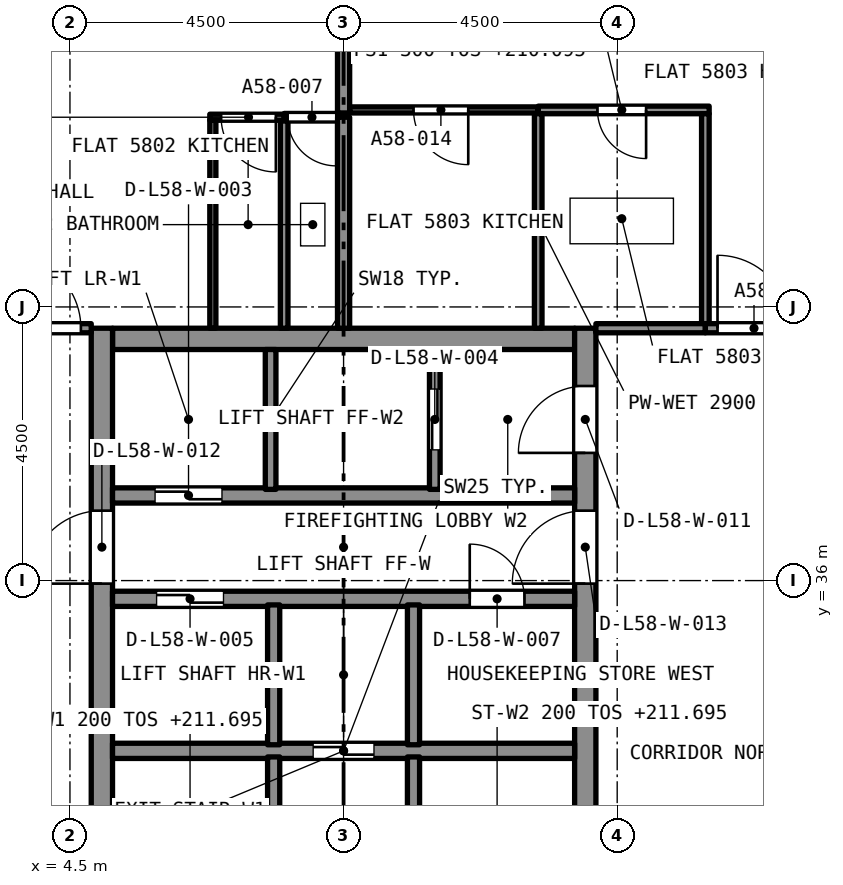
"""IFC4 building model, lengths in metres.
Left out: names, types, materials, properties, quantities, classifications, styles, units other than length and angle.
Written with IfcOpenShell. Run it as: python <this file> out.ifc"""

import sys

from ifc_helpers import new_model, si_unit, direction, frame, frame_2d, origin, place, context, subcontext, project, spatial, rectangle, extrude, element, fill, save


model = new_model("IFC4")
c1 = context("Model", 3, precision=1e-05, world=origin(), true_north=direction((0.0, 1.0)))
c2 = subcontext(c1, "Body", "Model", "MODEL_VIEW")
j1 = project(units=[si_unit("LENGTHUNIT", "METRE"), si_unit("PLANEANGLEUNIT", "RADIAN")], contexts=[c1])
p1 = place(None, origin())
s1 = spatial("IfcSite", under=j1, at=p1, CompositionType="ELEMENT")
p2 = place(p1, origin())
s2 = spatial("IfcBuilding", under=s1, at=p2, CompositionType="ELEMENT")
p3 = place(p2, frame((0.0, 0.0, 210.095)))
s3 = spatial("IfcBuildingStorey", under=s2, at=p3, CompositionType="ELEMENT", Elevation=210.095)
p4 = place(p3, frame((5.2, 39.975, 0.0), z_axis=(0.0, 0.0, 1.0), x_axis=(1.0, 0.0, 0.0)))
e1 = element("IfcWall", 1, at=p4, inside=s3, PredefinedType="SOLIDWALL", context=c2, shape_type="SweptSolid", body=[
    extrude(rectangle(XDim=7.6, YDim=0.35, at=frame_2d((3.8, 0.0))), origin(), (0.0, 0.0, 1.0), 3.2),
])
p5 = place(p3, frame((5.025, 27.35, 0.0), z_axis=(0.0, 0.0, 1.0), x_axis=(0.0, 1.0, 0.0)))
e2 = element("IfcWall", 2, at=p5, inside=s3, PredefinedType="SOLIDWALL", context=c2, shape_type="SweptSolid", body=[
    extrude(rectangle(XDim=12.8, YDim=0.35, at=frame_2d((6.4, 0.0))), origin(), (0.0, 0.0, 1.0), 3.2),
])
p6 = place(p5, frame((8.6, 0.0, 0.0)))
e3 = element("IfcOpeningElement", 3, at=p6, cuts=e2, PredefinedType="OPENING", context=c2, shape_type="SweptSolid", body=[
    extrude(rectangle(XDim=1.2, YDim=2.1, at=frame_2d((0.6, 1.05))), frame((0.0, 0.185, 0.0), z_axis=(0.0, -1.0, 0.0), x_axis=(1.0, 0.0, 0.0)), (0.0, 0.0, 1.0), 0.37),
])
p7 = place(p3, frame((12.975, 27.35, 0.0), z_axis=(0.0, 0.0, 1.0), x_axis=(0.0, 1.0, 0.0)))
e4 = element("IfcWall", 4, at=p7, inside=s3, PredefinedType="SOLIDWALL", context=c2, shape_type="SweptSolid", body=[
    extrude(rectangle(XDim=12.8, YDim=0.35, at=frame_2d((6.4, 0.0))), origin(), (0.0, 0.0, 1.0), 3.2),
])
p8 = place(p7, frame((10.75, 0.0, 0.0)))
e5 = element("IfcOpeningElement", 5, at=p8, cuts=e4, PredefinedType="OPENING", context=c2, shape_type="SweptSolid", body=[
    extrude(rectangle(XDim=1.1, YDim=2.1, at=frame_2d((0.55, 1.05))), frame((0.0, 0.185, 0.0), z_axis=(0.0, -1.0, 0.0), x_axis=(1.0, 0.0, 0.0)), (0.0, 0.0, 1.0), 0.37),
])
p9 = place(p7, frame((8.6, 0.0, 0.0)))
e6 = element("IfcOpeningElement", 6, at=p9, cuts=e4, PredefinedType="OPENING", context=c2, shape_type="SweptSolid", body=[
    extrude(rectangle(XDim=1.2, YDim=2.1, at=frame_2d((0.6, 1.05))), frame((0.0, 0.185, 0.0), z_axis=(0.0, -1.0, 0.0), x_axis=(1.0, 0.0, 0.0)), (0.0, 0.0, 1.0), 0.37),
])
p10 = place(p3, frame((9.0, 43.62, 0.0), z_axis=(0.0, 0.0, 1.0), x_axis=(-1.0, 0.0, 0.0)))
e7 = element("IfcWall", 7, at=p10, inside=s3, PredefinedType="PARTITIONING", context=c2, shape_type="SweptSolid", body=[
    extrude(rectangle(XDim=0.977, YDim=0.125, at=frame_2d((0.489, 0.0))), origin(), (0.0, 0.0, 1.0), 2.9),
])
p11 = place(p10, frame((0.12, 0.0, 0.0)))
e8 = element("IfcOpeningElement", 8, at=p11, cuts=e7, PredefinedType="OPENING", context=c2, shape_type="SweptSolid", body=[
    extrude(rectangle(XDim=0.8, YDim=2.1, at=frame_2d((0.4, 1.05))), frame((0.0, 0.073, 0.0), z_axis=(0.0, -1.0, 0.0), x_axis=(1.0, 0.0, 0.0)), (0.0, 0.0, 1.0), 0.145),
])
p12 = place(p3, frame((8.023, 40.15, 0.0), z_axis=(0.0, 0.0, 1.0), x_axis=(0.0, 1.0, 0.0)))
e9 = element("IfcWall", 9, at=p12, inside=s3, PredefinedType="PARTITIONING", context=c2, shape_type="SweptSolid", body=[
    extrude(rectangle(XDim=3.408, YDim=0.125, at=frame_2d((1.704, 0.0))), origin(), (0.0, 0.0, 1.0), 2.9),
])
p13 = place(p3, frame((9.0, 40.15, 0.0), z_axis=(0.0, 0.0, 1.0), x_axis=(0.0, 1.0, 0.0)))
e10 = element("IfcWall", 10, at=p13, inside=s3, PredefinedType="PARTITIONING", context=c2, shape_type="SweptSolid", body=[
    extrude(rectangle(XDim=3.47, YDim=0.2, at=frame_2d((1.735, 0.0))), origin(), (0.0, 0.0, 1.0), 2.9),
])
p14 = place(p3, frame((8.023, 43.62, 0.0), z_axis=(0.0, 0.0, 1.0), x_axis=(-1.0, 0.0, 0.0)))
e11 = element("IfcWall", 11, at=p14, inside=s3, PredefinedType="PARTITIONING", context=c2, shape_type="SweptSolid", body=[
    extrude(rectangle(XDim=1.223, YDim=0.1, at=frame_2d((0.611, 0.0))), origin(), (0.0, 0.0, 1.0), 2.9),
])
p15 = place(p14, frame((0.136, 0.0, 0.0)))
e12 = element("IfcOpeningElement", 12, at=p15, cuts=e11, PredefinedType="OPENING", context=c2, shape_type="SweptSolid", body=[
    extrude(rectangle(XDim=0.9, YDim=2.1, at=frame_2d((0.45, 1.05))), frame((0.0, 0.06, 0.0), z_axis=(0.0, -1.0, 0.0), x_axis=(1.0, 0.0, 0.0)), (0.0, 0.0, 1.0), 0.12),
])
p16 = place(p3, frame((6.85, 40.15, 0.0), z_axis=(0.0, 0.0, 1.0), x_axis=(0.0, 1.0, 0.0)))
e13 = element("IfcWall", 13, at=p16, inside=s3, PredefinedType="PARTITIONING", context=c2, shape_type="SweptSolid", body=[
    extrude(rectangle(XDim=3.42, YDim=0.1, at=frame_2d((1.71, 0.0))), origin(), (0.0, 0.0, 1.0), 2.9),
])
p17 = place(p3, frame((9.0, 43.69, 0.0), z_axis=(0.0, 0.0, 1.0), x_axis=(0.0, 1.0, 0.0)))
e14 = element("IfcWall", 14, at=p17, inside=s3, PredefinedType="PARTITIONING", context=c2, shape_type="SweptSolid", body=[
    extrude(rectangle(XDim=1.36, YDim=0.2, at=frame_2d((0.68, 0.0))), origin(), (0.0, 0.0, 1.0), 2.9),
])
p18 = place(p3, frame((3.35, 40.15, 0.0), z_axis=(0.0, 0.0, 1.0), x_axis=(1.0, 0.0, 0.0)))
e15 = element("IfcWall", 15, at=p18, inside=s3, PredefinedType="PARTITIONING", context=c2, shape_type="SweptSolid", body=[
    extrude(rectangle(XDim=1.5, YDim=0.15, at=frame_2d((0.75, 0.0))), origin(), (0.0, 0.0, 1.0), 2.9),
])
p19 = place(p18, frame((0.13, 0.0, 0.0)))
e16 = element("IfcOpeningElement", 16, at=p19, cuts=e15, PredefinedType="OPENING", context=c2, shape_type="SweptSolid", body=[
    extrude(rectangle(XDim=1.2, YDim=2.4, at=frame_2d((0.6, 1.2))), frame((0.0, 0.085, 0.0), z_axis=(0.0, -1.0, 0.0), x_axis=(1.0, 0.0, 0.0)), (0.0, 0.0, 1.0), 0.17),
])
p20 = place(p3, frame((15.012, 43.74, 0.0), z_axis=(0.0, 0.0, 1.0), x_axis=(-1.0, 0.0, 0.0)))
e17 = element("IfcWall", 17, at=p20, inside=s3, PredefinedType="PARTITIONING", context=c2, shape_type="SweptSolid", body=[
    extrude(rectangle(XDim=2.812, YDim=0.125, at=frame_2d((1.406, 0.0))), origin(), (0.0, 0.0, 1.0), 2.9),
])
p21 = place(p20, frame((1.037, 0.0, 0.0)))
e18 = element("IfcOpeningElement", 18, at=p21, cuts=e17, PredefinedType="OPENING", context=c2, shape_type="SweptSolid", body=[
    extrude(rectangle(XDim=0.8, YDim=2.1, at=frame_2d((0.4, 1.05))), frame((0.0, 0.073, 0.0), z_axis=(0.0, -1.0, 0.0), x_axis=(1.0, 0.0, 0.0)), (0.0, 0.0, 1.0), 0.145),
])
p22 = place(p3, frame((14.95, 40.225, 0.0), z_axis=(0.0, 0.0, 1.0), x_axis=(0.0, 1.0, 0.0)))
e19 = element("IfcWall", 19, at=p22, inside=s3, PredefinedType="PARTITIONING", context=c2, shape_type="SweptSolid", body=[
    extrude(rectangle(XDim=3.452, YDim=0.125, at=frame_2d((1.726, 0.0))), origin(), (0.0, 0.0, 1.0), 2.9),
])
p23 = place(p3, frame((12.201, 40.15, 0.0), z_axis=(0.0, 0.0, 1.0), x_axis=(0.0, 1.0, 0.0)))
e20 = element("IfcWall", 20, at=p23, inside=s3, PredefinedType="PARTITIONING", context=c2, shape_type="SweptSolid", body=[
    extrude(rectangle(XDim=3.528, YDim=0.125, at=frame_2d((1.764, 0.0))), origin(), (0.0, 0.0, 1.0), 2.9),
])
p24 = place(p3, frame((13.15, 40.15, 0.0), z_axis=(0.0, 0.0, 1.0), x_axis=(1.0, 0.0, 0.0)))
e21 = element("IfcWall", 21, at=p24, inside=s3, PredefinedType="PARTITIONING", context=c2, shape_type="SweptSolid", body=[
    extrude(rectangle(XDim=1.8, YDim=0.15, at=frame_2d((0.9, 0.0))), origin(), (0.0, 0.0, 1.0), 2.9),
])
p25 = place(p3, frame((12.201, 43.74, 0.0), z_axis=(0.0, 0.0, 1.0), x_axis=(-1.0, 0.0, 0.0)))
e22 = element("IfcWall", 22, at=p25, inside=s3, PredefinedType="PARTITIONING", context=c2, shape_type="SweptSolid", body=[
    extrude(rectangle(XDim=3.101, YDim=0.1, at=frame_2d((1.55, 0.0))), origin(), (0.0, 0.0, 1.0), 2.9),
])
p26 = place(p25, frame((1.15, 0.0, 0.0)))
e23 = element("IfcOpeningElement", 23, at=p26, cuts=e22, PredefinedType="OPENING", context=c2, shape_type="SweptSolid", body=[
    extrude(rectangle(XDim=0.9, YDim=2.1, at=frame_2d((0.45, 1.05))), frame((0.0, 0.06, 0.0), z_axis=(0.0, -1.0, 0.0), x_axis=(1.0, 0.0, 0.0)), (0.0, 0.0, 1.0), 0.12),
])
p27 = place(p3, frame((14.95, 40.15, 0.0), z_axis=(0.0, 0.0, 1.0), x_axis=(1.0, 0.0, 0.0)))
e24 = element("IfcWall", 24, at=p27, inside=s3, PredefinedType="PARTITIONING", context=c2, shape_type="SweptSolid", body=[
    extrude(rectangle(XDim=2.65, YDim=0.15, at=frame_2d((1.325, 0.0))), origin(), (0.0, 0.0, 1.0), 2.9),
])
p28 = place(p27, frame((0.2, 0.0, 0.0)))
e25 = element("IfcOpeningElement", 25, at=p28, cuts=e24, PredefinedType="OPENING", context=c2, shape_type="SweptSolid", body=[
    extrude(rectangle(XDim=1.2, YDim=2.4, at=frame_2d((0.6, 1.2))), frame((0.0, 0.085, 0.0), z_axis=(0.0, -1.0, 0.0), x_axis=(1.0, 0.0, 0.0)), (0.0, 0.0, 1.0), 0.17),
])
p29 = place(p3, frame((5.2, 33.2, 0.0), z_axis=(0.0, 0.0, 1.0), x_axis=(1.0, 0.0, 0.0)))
e26 = element("IfcWall", 26, at=p29, inside=s3, PredefinedType="SOLIDWALL", context=c2, shape_type="SweptSolid", body=[
    extrude(rectangle(XDim=7.6, YDim=0.25, at=frame_2d((3.8, 0.0))), origin(), (0.0, 0.0, 1.0), 2.9),
])
p30 = place(p29, frame((3.3, 0.0, 0.0)))
e27 = element("IfcOpeningElement", 27, at=p30, cuts=e26, PredefinedType="OPENING", context=c2, shape_type="SweptSolid", body=[
    extrude(rectangle(XDim=1.0, YDim=2.1, at=frame_2d((0.5, 1.05))), frame((0.0, 0.135, 0.0), z_axis=(0.0, -1.0, 0.0), x_axis=(1.0, 0.0, 0.0)), (0.0, 0.0, 1.0), 0.27),
])
p31 = place(p3, frame((5.2, 35.7, 0.0), z_axis=(0.0, 0.0, 1.0), x_axis=(1.0, 0.0, 0.0)))
e28 = element("IfcWall", 28, at=p31, inside=s3, PredefinedType="SOLIDWALL", context=c2, shape_type="SweptSolid", body=[
    extrude(rectangle(XDim=7.6, YDim=0.25, at=frame_2d((3.8, 0.0))), origin(), (0.0, 0.0, 1.0), 2.9),
])
p32 = place(p31, frame((0.725, 0.0, 0.0)))
e29 = element("IfcOpeningElement", 29, at=p32, cuts=e28, PredefinedType="OPENING", context=c2, shape_type="SweptSolid", body=[
    extrude(rectangle(XDim=1.1, YDim=2.4, at=frame_2d((0.55, 1.2))), frame((0.0, 0.135, 0.0), z_axis=(0.0, -1.0, 0.0), x_axis=(1.0, 0.0, 0.0)), (0.0, 0.0, 1.0), 0.27),
])
p33 = place(p31, frame((5.875, 0.0, 0.0)))
e30 = element("IfcOpeningElement", 30, at=p33, cuts=e28, PredefinedType="OPENING", context=c2, shape_type="SweptSolid", body=[
    extrude(rectangle(XDim=0.9, YDim=2.1, at=frame_2d((0.45, 1.05))), frame((0.0, 0.135, 0.0), z_axis=(0.0, -1.0, 0.0), x_axis=(1.0, 0.0, 0.0)), (0.0, 0.0, 1.0), 0.27),
])
p34 = place(p3, frame((5.2, 37.4, 0.0), z_axis=(0.0, 0.0, 1.0), x_axis=(1.0, 0.0, 0.0)))
e31 = element("IfcWall", 31, at=p34, inside=s3, PredefinedType="SOLIDWALL", context=c2, shape_type="SweptSolid", body=[
    extrude(rectangle(XDim=7.6, YDim=0.25, at=frame_2d((3.8, 0.0))), origin(), (0.0, 0.0, 1.0), 2.9),
])
p35 = place(p34, frame((0.7, 0.0, 0.0)))
e32 = element("IfcOpeningElement", 32, at=p35, cuts=e31, PredefinedType="OPENING", context=c2, shape_type="SweptSolid", body=[
    extrude(rectangle(XDim=1.1, YDim=2.4, at=frame_2d((0.55, 1.2))), frame((0.0, 0.135, 0.0), z_axis=(0.0, -1.0, 0.0), x_axis=(1.0, 0.0, 0.0)), (0.0, 0.0, 1.0), 0.27),
])
p36 = place(p3, frame((7.85, 27.7, 0.0), z_axis=(0.0, 0.0, 1.0), x_axis=(0.0, 1.0, 0.0)))
e33 = element("IfcWall", 33, at=p36, inside=s3, PredefinedType="SOLIDWALL", context=c2, shape_type="SweptSolid", body=[
    extrude(rectangle(XDim=5.4, YDim=0.2, at=frame_2d((2.7, 0.0))), origin(), (0.0, 0.0, 1.0), 2.9),
])
p37 = place(p36, frame((0.2, 0.0, 0.0)))
e34 = element("IfcOpeningElement", 34, at=p37, cuts=e33, PredefinedType="OPENING", context=c2, shape_type="SweptSolid", body=[
    extrude(rectangle(XDim=0.9, YDim=2.1, at=frame_2d((0.45, 1.05))), frame((0.0, 0.11, 0.0), z_axis=(0.0, -1.0, 0.0), x_axis=(1.0, 0.0, 0.0)), (0.0, 0.0, 1.0), 0.22),
])
p38 = place(p3, frame((10.15, 27.7, 0.0), z_axis=(0.0, 0.0, 1.0), x_axis=(0.0, 1.0, 0.0)))
e35 = element("IfcWall", 35, at=p38, inside=s3, PredefinedType="SOLIDWALL", context=c2, shape_type="SweptSolid", body=[
    extrude(rectangle(XDim=5.4, YDim=0.2, at=frame_2d((2.7, 0.0))), origin(), (0.0, 0.0, 1.0), 2.9),
])
p39 = place(p38, frame((0.2, 0.0, 0.0)))
e36 = element("IfcOpeningElement", 36, at=p39, cuts=e35, PredefinedType="OPENING", context=c2, shape_type="SweptSolid", body=[
    extrude(rectangle(XDim=0.9, YDim=2.1, at=frame_2d((0.45, 1.05))), frame((0.0, 0.11, 0.0), z_axis=(0.0, -1.0, 0.0), x_axis=(1.0, 0.0, 0.0)), (0.0, 0.0, 1.0), 0.22),
])
for number, where, z_axis, x_axis in (
    (37, (7.85, 33.3, 0.0), (0.0, 0.0, 1.0), (0.0, 1.0, 0.0)),
    (38, (10.15, 33.3, 0.0), (0.0, 0.0, 1.0), (0.0, 1.0, 0.0)),
):
    element("IfcWall", number, at=place(p3, frame(where, z_axis=z_axis, x_axis=x_axis)), inside=s3, PredefinedType="SOLIDWALL", context=c2, shape_type="SweptSolid", body=[
        extrude(rectangle(XDim=2.3, YDim=0.2, at=frame_2d((1.15, 0.0))), origin(), (0.0, 0.0, 1.0), 2.9),
    ])
p40 = place(p3, frame((7.8, 37.5, 0.0), z_axis=(0.0, 0.0, 1.0), x_axis=(0.0, 1.0, 0.0)))
e39 = element("IfcWall", 39, at=p40, inside=s3, PredefinedType="SOLIDWALL", context=c2, shape_type="SweptSolid", body=[
    extrude(rectangle(XDim=2.3, YDim=0.175, at=frame_2d((1.15, 0.0))), origin(), (0.0, 0.0, 1.0), 2.9),
])
p41 = place(p3, frame((10.5, 37.5, 0.0), z_axis=(0.0, 0.0, 1.0), x_axis=(0.0, 1.0, 0.0)))
e40 = element("IfcWall", 40, at=p41, inside=s3, PredefinedType="SOLIDWALL", context=c2, shape_type="SweptSolid", body=[
    extrude(rectangle(XDim=2.3, YDim=0.175, at=frame_2d((1.15, 0.0))), origin(), (0.0, 0.0, 1.0), 2.9),
])
p42 = place(p41, frame((0.65, 0.0, 0.0)))
e41 = element("IfcOpeningElement", 41, at=p42, cuts=e40, PredefinedType="OPENING", context=c2, shape_type="SweptSolid", body=[
    extrude(rectangle(XDim=1.0, YDim=2.1, at=frame_2d((0.5, 1.05))), frame((0.0, 0.097, 0.0), z_axis=(0.0, -1.0, 0.0), x_axis=(1.0, 0.0, 0.0)), (0.0, 0.0, 1.0), 0.195),
])
p43 = place(p11, origin())
e42 = element("IfcDoor", 42, at=p43, inside=s3, OperationType="SINGLE_SWING_LEFT", PredefinedType="DOOR", context=c2, shape_type="SweptSolid", body=[
    extrude(rectangle(XDim=0.8, YDim=2.1, at=frame_2d((0.4, 1.05))), frame((0.0, 0.025, 0.0), z_axis=(0.0, -1.0, 0.0), x_axis=(1.0, 0.0, 0.0)), (0.0, 0.0, 1.0), 0.05),
])
fill(e8, e42)
p44 = place(p15, origin())
e43 = element("IfcDoor", 43, at=p44, inside=s3, OperationType="SINGLE_SWING_LEFT", PredefinedType="DOOR", context=c2, shape_type="SweptSolid", body=[
    extrude(rectangle(XDim=0.9, YDim=2.1, at=frame_2d((0.45, 1.05))), frame((0.0, 0.025, 0.0), z_axis=(0.0, -1.0, 0.0), x_axis=(1.0, 0.0, 0.0)), (0.0, 0.0, 1.0), 0.05),
])
fill(e12, e43)
p45 = place(p19, origin())
e44 = element("IfcDoor", 44, at=p45, inside=s3, OperationType="SINGLE_SWING_LEFT", PredefinedType="DOOR", context=c2, shape_type="SweptSolid", body=[
    extrude(rectangle(XDim=1.2, YDim=2.4, at=frame_2d((0.6, 1.2))), frame((0.0, 0.025, 0.0), z_axis=(0.0, -1.0, 0.0), x_axis=(1.0, 0.0, 0.0)), (0.0, 0.0, 1.0), 0.05),
])
fill(e16, e44)
p46 = place(p21, origin())
e45 = element("IfcDoor", 45, at=p46, inside=s3, OperationType="SINGLE_SWING_RIGHT", PredefinedType="DOOR", context=c2, shape_type="SweptSolid", body=[
    extrude(rectangle(XDim=0.8, YDim=2.1, at=frame_2d((0.4, 1.05))), frame((0.0, 0.025, 0.0), z_axis=(0.0, -1.0, 0.0), x_axis=(1.0, 0.0, 0.0)), (0.0, 0.0, 1.0), 0.05),
])
fill(e18, e45)
p47 = place(p26, origin())
e46 = element("IfcDoor", 46, at=p47, inside=s3, OperationType="SINGLE_SWING_RIGHT", PredefinedType="DOOR", context=c2, shape_type="SweptSolid", body=[
    extrude(rectangle(XDim=0.9, YDim=2.1, at=frame_2d((0.45, 1.05))), frame((0.0, 0.025, 0.0), z_axis=(0.0, -1.0, 0.0), x_axis=(1.0, 0.0, 0.0)), (0.0, 0.0, 1.0), 0.05),
])
fill(e23, e46)
p48 = place(p28, origin())
e47 = element("IfcDoor", 47, at=p48, inside=s3, OperationType="SINGLE_SWING_LEFT", PredefinedType="DOOR", context=c2, shape_type="SweptSolid", body=[
    extrude(rectangle(XDim=1.2, YDim=2.4, at=frame_2d((0.6, 1.2))), frame((0.0, 0.025, 0.0), z_axis=(0.0, -1.0, 0.0), x_axis=(1.0, 0.0, 0.0)), (0.0, 0.0, 1.0), 0.05),
])
fill(e25, e47)
p49 = place(p35, origin())
e48 = element("IfcDoor", 48, at=p49, inside=s3, OperationType="SLIDING_TO_LEFT", PredefinedType="DOOR", context=c2, shape_type="SweptSolid", body=[
    extrude(rectangle(XDim=1.1, YDim=2.4, at=frame_2d((0.55, 1.2))), frame((0.0, 0.025, 0.0), z_axis=(0.0, -1.0, 0.0), x_axis=(1.0, 0.0, 0.0)), (0.0, 0.0, 1.0), 0.05),
])
fill(e32, e48)
p50 = place(p42, origin())
e49 = element("IfcDoor", 49, at=p50, inside=s3, OperationType="SLIDING_TO_LEFT", PredefinedType="DOOR", context=c2, shape_type="SweptSolid", body=[
    extrude(rectangle(XDim=1.0, YDim=2.1, at=frame_2d((0.5, 1.05))), frame((0.0, 0.025, 0.0), z_axis=(0.0, -1.0, 0.0), x_axis=(1.0, 0.0, 0.0)), (0.0, 0.0, 1.0), 0.05),
])
fill(e41, e49)
p51 = place(p32, origin())
e50 = element("IfcDoor", 50, at=p51, inside=s3, OperationType="SLIDING_TO_LEFT", PredefinedType="DOOR", context=c2, shape_type="SweptSolid", body=[
    extrude(rectangle(XDim=1.1, YDim=2.4, at=frame_2d((0.55, 1.2))), frame((0.0, 0.025, 0.0), z_axis=(0.0, -1.0, 0.0), x_axis=(1.0, 0.0, 0.0)), (0.0, 0.0, 1.0), 0.05),
])
fill(e29, e50)
p52 = place(p30, origin())
e51 = element("IfcDoor", 51, at=p52, inside=s3, OperationType="SLIDING_TO_LEFT", PredefinedType="DOOR", context=c2, shape_type="SweptSolid", body=[
    extrude(rectangle(XDim=1.0, YDim=2.1, at=frame_2d((0.5, 1.05))), frame((0.0, 0.025, 0.0), z_axis=(0.0, -1.0, 0.0), x_axis=(1.0, 0.0, 0.0)), (0.0, 0.0, 1.0), 0.05),
])
fill(e27, e51)
p53 = place(p33, origin())
e52 = element("IfcDoor", 52, at=p53, inside=s3, OperationType="SINGLE_SWING_LEFT", PredefinedType="DOOR", context=c2, shape_type="SweptSolid", body=[
    extrude(rectangle(XDim=0.9, YDim=2.1, at=frame_2d((0.45, 1.05))), frame((0.0, 0.025, 0.0), z_axis=(0.0, -1.0, 0.0), x_axis=(1.0, 0.0, 0.0)), (0.0, 0.0, 1.0), 0.05),
])
fill(e30, e52)
p54 = place(p8, origin())
e53 = element("IfcDoor", 53, at=p54, inside=s3, OperationType="SINGLE_SWING_LEFT", PredefinedType="DOOR", context=c2, shape_type="SweptSolid", body=[
    extrude(rectangle(XDim=1.1, YDim=2.1, at=frame_2d((0.55, 1.05))), frame((0.0, 0.025, 0.0), z_axis=(0.0, -1.0, 0.0), x_axis=(1.0, 0.0, 0.0)), (0.0, 0.0, 1.0), 0.05),
])
fill(e5, e53)
p55 = place(p6, origin())
e54 = element("IfcDoor", 54, at=p55, inside=s3, OperationType="SINGLE_SWING_LEFT", PredefinedType="DOOR", context=c2, shape_type="SweptSolid", body=[
    extrude(rectangle(XDim=1.2, YDim=2.1, at=frame_2d((0.6, 1.05))), frame((0.0, 0.025, 0.0), z_axis=(0.0, -1.0, 0.0), x_axis=(1.0, 0.0, 0.0)), (0.0, 0.0, 1.0), 0.05),
])
fill(e3, e54)
p56 = place(p9, origin())
e55 = element("IfcDoor", 55, at=p56, inside=s3, OperationType="SINGLE_SWING_LEFT", PredefinedType="DOOR", context=c2, shape_type="SweptSolid", body=[
    extrude(rectangle(XDim=1.2, YDim=2.1, at=frame_2d((0.6, 1.05))), frame((0.0, 0.025, 0.0), z_axis=(0.0, -1.0, 0.0), x_axis=(1.0, 0.0, 0.0)), (0.0, 0.0, 1.0), 0.05),
])
fill(e6, e55)
save(model, sys.argv[1])
